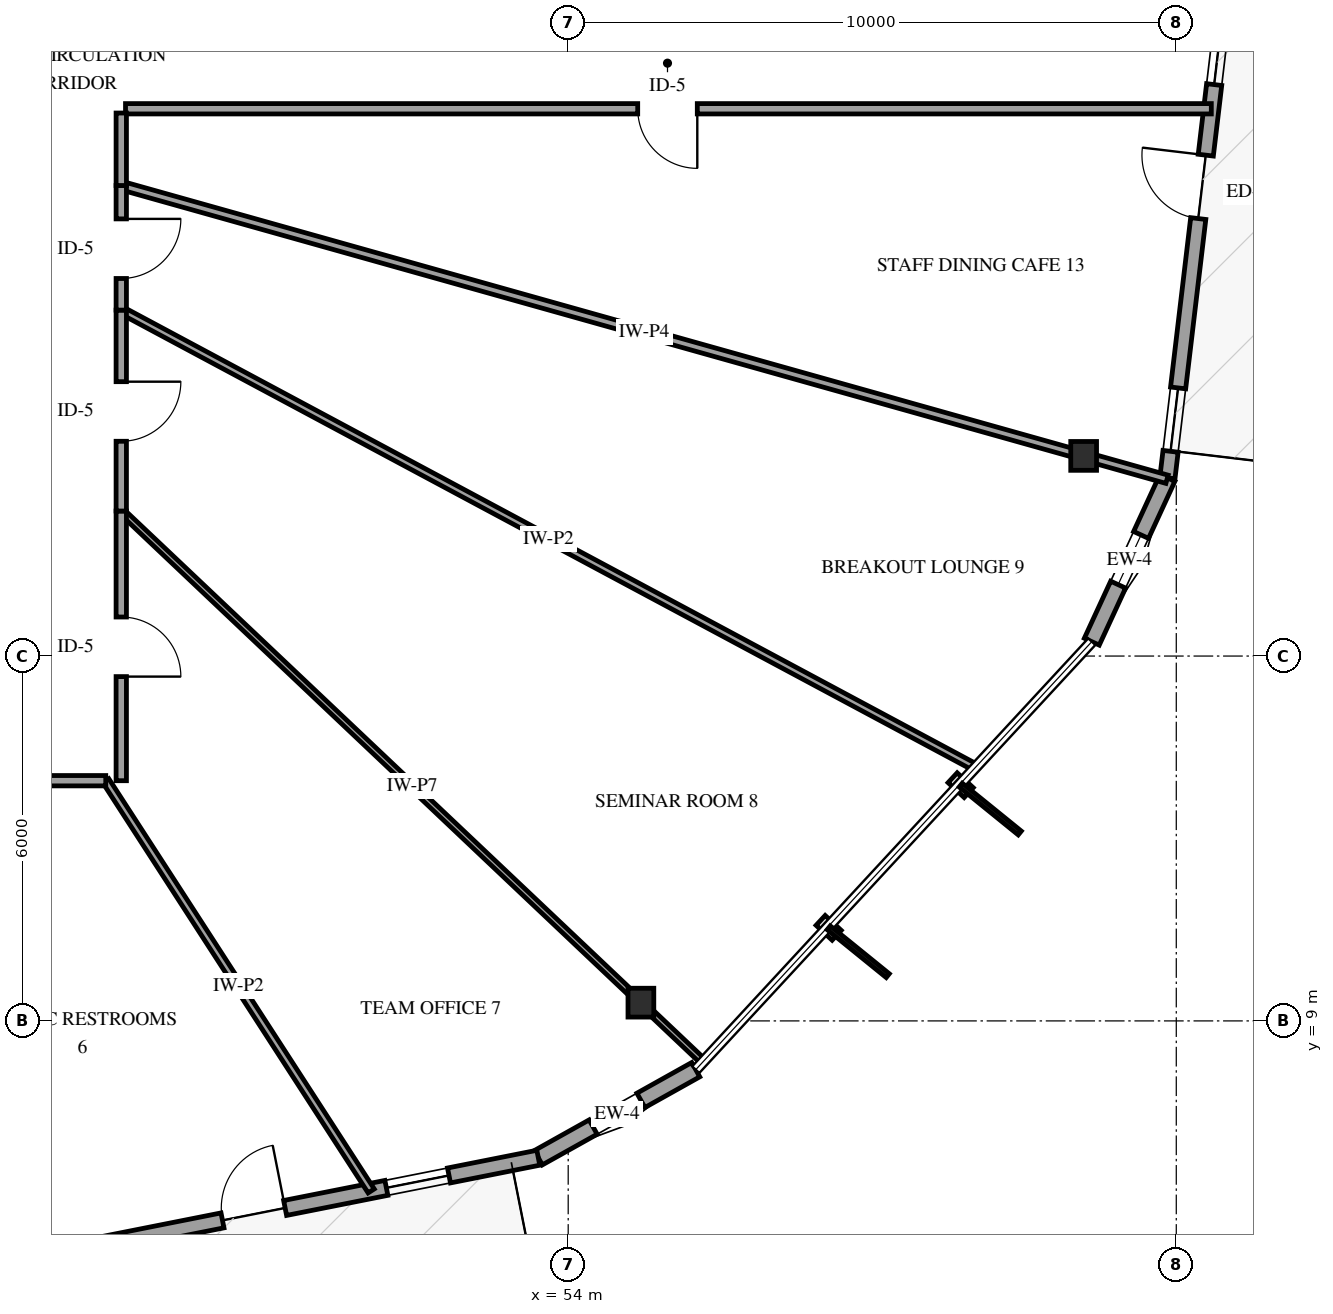
"""IFC4 building model, lengths in metres.
Left out: names, types, materials, properties, quantities, classifications, styles, units other than length and angle.
Written with IfcOpenShell. Run it as: python <this file> out.ifc"""

import sys

from ifc_helpers import new_model, si_unit, direction, frame, frame_2d, origin, origin_2d, place, context, subcontext, project, spatial, rectangle, i_section, extrude, element, fill, save


model = new_model("IFC4")
c1 = context("Model", 3, precision=1e-05, world=origin(), true_north=direction((0.0, 1.0)))
c2 = subcontext(c1, "Body", "Model", "MODEL_VIEW")
j1 = project(units=[si_unit("LENGTHUNIT", "METRE"), si_unit("PLANEANGLEUNIT", "RADIAN")], contexts=[c1])
p1 = place(None, origin())
s1 = spatial("IfcSite", under=j1, at=p1, CompositionType="ELEMENT")
p2 = place(p1, origin())
s2 = spatial("IfcBuilding", under=s1, at=p2, CompositionType="ELEMENT")
p3 = place(p2, frame((0.0, 0.0, 70.6)))
s3 = spatial("IfcBuildingStorey", under=s2, at=p3, CompositionType="ELEMENT", Elevation=70.6)
for number, where, z_axis, x_axis in (
    (1, (55.196, 9.3, 0.0), (0.0, 0.0, 1.0), (1.0, 0.0, 0.0)),
    (2, (62.477, 18.292, 0.0), (0.0, 0.0, 1.0), (1.0, 0.0, 0.0)),
):
    element("IfcColumn", number, at=place(p3, frame(where, z_axis=z_axis, x_axis=x_axis)), inside=s3, PredefinedType="COLUMN", context=c2, shape_type="SweptSolid", body=[
        extrude(i_section(OverallWidth=0.424, OverallDepth=0.474, WebThickness=0.048, FlangeThickness=0.077, FilletRadius=0.038, at=origin_2d()), origin(), (0.0, 0.0, 1.0), 4.0),
    ])
p4 = place(p3, frame((53.509, 6.75, 0.0), z_axis=(0.0, 0.0, 1.0), x_axis=(0.872744478874, 0.48817729832, 0.0)))
e3 = element("IfcWall", 3, at=p4, inside=s3, PredefinedType="SOLIDWALL", context=c2, shape_type="SweptSolid", body=[
    extrude(rectangle(XDim=2.967, YDim=0.27, at=frame_2d((1.483, 0.0))), origin(), (0.0, 0.0, 1.0), 3.079),
])
p5 = place(p4, frame((1.033, 0.0, 0.75)))
e4 = element("IfcOpeningElement", 4, at=p5, cuts=e3, PredefinedType="OPENING", context=c2, shape_type="SweptSolid", body=[
    extrude(rectangle(XDim=0.9, YDim=1.5, at=frame_2d((0.45, 0.75))), frame((0.0, 0.145, 0.0), z_axis=(0.0, -1.0, 0.0), x_axis=(1.0, 0.0, 0.0)), (0.0, 0.0, 1.0), 0.29),
])
p6 = place(p3, frame((44.102, 4.884, 0.0), z_axis=(0.0, 0.0, 1.0), x_axis=(0.980886929862, 0.194578598067, 0.0)))
e5 = element("IfcWall", 5, at=p6, inside=s3, PredefinedType="SOLIDWALL", context=c2, shape_type="SweptSolid", body=[
    extrude(rectangle(XDim=9.59, YDim=0.25, at=frame_2d((4.795, 0.0))), origin(), (0.0, 0.0, 1.0), 3.079),
])
p7 = place(p6, frame((4.295, 0.0, 0.0)))
e6 = element("IfcOpeningElement", 6, at=p7, cuts=e5, PredefinedType="OPENING", context=c2, shape_type="SweptSolid", body=[
    extrude(rectangle(XDim=1.05, YDim=2.15, at=frame_2d((0.525, 1.075))), frame((0.0, 0.135, 0.0), z_axis=(0.0, -1.0, 0.0), x_axis=(1.0, 0.0, 0.0)), (0.0, 0.0, 1.0), 0.27),
])
p8 = place(p6, frame((0.62, 0.0, 0.72)))
e7 = element("IfcOpeningElement", 7, at=p8, cuts=e5, PredefinedType="OPENING", context=c2, shape_type="SweptSolid", body=[
    extrude(rectangle(XDim=1.05, YDim=1.55, at=frame_2d((0.525, 0.775))), frame((0.0, 0.135, 0.0), z_axis=(0.0, -1.0, 0.0), x_axis=(1.0, 0.0, 0.0)), (0.0, 0.0, 1.0), 0.27),
])
p9 = place(p6, frame((7.042, 0.0, 0.72)))
e8 = element("IfcOpeningElement", 8, at=p9, cuts=e5, PredefinedType="OPENING", context=c2, shape_type="SweptSolid", body=[
    extrude(rectangle(XDim=1.05, YDim=1.55, at=frame_2d((0.525, 0.775))), frame((0.0, 0.135, 0.0), z_axis=(0.0, -1.0, 0.0), x_axis=(1.0, 0.0, 0.0)), (0.0, 0.0, 1.0), 0.27),
])
p10 = place(p3, frame((62.611, 15.236, 0.0), z_axis=(0.0, 0.0, 1.0), x_axis=(0.419146897393, 0.907918431582, 0.0)))
e9 = element("IfcWall", 9, at=p10, inside=s3, PredefinedType="SOLIDWALL", context=c2, shape_type="SweptSolid", body=[
    extrude(rectangle(XDim=2.967, YDim=0.27, at=frame_2d((1.483, 0.0))), origin(), (0.0, 0.0, 1.0), 3.079),
])
p11 = place(p10, frame((1.033, 0.0, 0.75)))
e10 = element("IfcOpeningElement", 10, at=p11, cuts=e9, PredefinedType="OPENING", context=c2, shape_type="SweptSolid", body=[
    extrude(rectangle(XDim=0.9, YDim=1.5, at=frame_2d((0.45, 0.75))), frame((0.0, 0.145, 0.0), z_axis=(0.0, -1.0, 0.0), x_axis=(1.0, 0.0, 0.0)), (0.0, 0.0, 1.0), 0.29),
])
p12 = place(p3, frame((63.854, 17.93, 0.0), z_axis=(0.0, 0.0, 1.0), x_axis=(0.118050916003, 0.993007543391, 0.0)))
e11 = element("IfcWall", 11, at=p12, inside=s3, PredefinedType="SOLIDWALL", context=c2, shape_type="SweptSolid", body=[
    extrude(rectangle(XDim=9.59, YDim=0.25, at=frame_2d((4.795, 0.0))), origin(), (0.0, 0.0, 1.0), 3.079),
])
p13 = place(p12, frame((4.295, 0.0, 0.0)))
e12 = element("IfcOpeningElement", 12, at=p13, cuts=e11, PredefinedType="OPENING", context=c2, shape_type="SweptSolid", body=[
    extrude(rectangle(XDim=1.05, YDim=2.15, at=frame_2d((0.525, 1.075))), frame((0.0, 0.135, 0.0), z_axis=(0.0, -1.0, 0.0), x_axis=(1.0, 0.0, 0.0)), (0.0, 0.0, 1.0), 0.27),
])
p14 = place(p12, frame((0.44, 0.0, 0.72)))
e13 = element("IfcOpeningElement", 13, at=p14, cuts=e11, PredefinedType="OPENING", context=c2, shape_type="SweptSolid", body=[
    extrude(rectangle(XDim=1.05, YDim=1.55, at=frame_2d((0.525, 0.775))), frame((0.0, 0.135, 0.0), z_axis=(0.0, -1.0, 0.0), x_axis=(1.0, 0.0, 0.0)), (0.0, 0.0, 1.0), 0.27),
])
p15 = place(p12, frame((6.514, 0.0, 0.72)))
e14 = element("IfcOpeningElement", 14, at=p15, cuts=e11, PredefinedType="OPENING", context=c2, shape_type="SweptSolid", body=[
    extrude(rectangle(XDim=1.05, YDim=1.55, at=frame_2d((0.525, 0.775))), frame((0.0, 0.135, 0.0), z_axis=(0.0, -1.0, 0.0), x_axis=(1.0, 0.0, 0.0)), (0.0, 0.0, 1.0), 0.27),
])
p16 = place(p3, frame((46.65, 22.738, 0.0), z_axis=(0.0, 0.0, 1.0), x_axis=(0.96273671491, -0.270440414443, 0.0)))
e15 = element("IfcWall", 15, at=p16, inside=s3, PredefinedType="PARTITIONING", context=c2, shape_type="SweptSolid", body=[
    extrude(rectangle(XDim=17.864, YDim=0.14, at=frame_2d((8.932, 0.0))), origin(), (0.0, 0.0, 1.0), 2.995),
])
p17 = place(p3, frame((64.576, 24.0, 0.0), z_axis=(0.0, 0.0, 1.0), x_axis=(-1.0, 0.0, 0.0)))
e16 = element("IfcWall", 16, at=p17, inside=s3, PredefinedType="PARTITIONING", context=c2, shape_type="SweptSolid", body=[
    extrude(rectangle(XDim=17.856, YDim=0.17, at=frame_2d((8.928, 0.0))), origin(), (0.0, 0.0, 1.0), 3.7),
])
p18 = place(p17, frame((8.453, 0.0, 0.0)))
e17 = element("IfcOpeningElement", 17, at=p18, cuts=e16, PredefinedType="OPENING", context=c2, shape_type="SweptSolid", body=[
    extrude(rectangle(XDim=0.98, YDim=2.15, at=frame_2d((0.49, 1.075))), frame((0.0, 0.095, 0.0), z_axis=(0.0, -1.0, 0.0), x_axis=(1.0, 0.0, 0.0)), (0.0, 0.0, 1.0), 0.19),
])
p19 = place(p3, frame((46.65, 20.689, 0.0), z_axis=(0.0, 0.0, 1.0), x_axis=(0.881590875685, -0.472014330194, 0.0)))
e18 = element("IfcWall", 18, at=p19, inside=s3, PredefinedType="PARTITIONING", context=c2, shape_type="SweptSolid", body=[
    extrude(rectangle(XDim=15.934, YDim=0.12, at=frame_2d((7.967, 0.0))), origin(), (0.0, 0.0, 1.0), 3.7),
])
p20 = place(p3, frame((46.65, 17.385, 0.0), z_axis=(0.0, 0.0, 1.0), x_axis=(0.726386402193, -0.687286544834, 0.0)))
e19 = element("IfcWall", 19, at=p20, inside=s3, PredefinedType="PARTITIONING", context=c2, shape_type="SweptSolid", body=[
    extrude(rectangle(XDim=13.175, YDim=0.1, at=frame_2d((6.587, 0.0))), origin(), (0.0, 0.0, 1.0), 2.995),
])
p21 = place(p3, frame((46.395, 12.95, 0.0), z_axis=(0.0, 0.0, 1.0), x_axis=(0.543253797888, -0.839568526733, 0.0)))
e20 = element("IfcWall", 20, at=p21, inside=s3, PredefinedType="PARTITIONING", context=c2, shape_type="SweptSolid", body=[
    extrude(rectangle(XDim=8.035, YDim=0.12, at=frame_2d((4.018, 0.0))), origin(), (0.0, 0.0, 1.0), 3.7),
])
p22 = place(p3, frame((46.65, 17.385, 0.0), z_axis=(0.0, 0.0, 1.0), x_axis=(0.0, -1.0, 0.0)))
e21 = element("IfcWall", 21, at=p22, inside=s3, PredefinedType="PARTITIONING", context=c2, shape_type="SweptSolid", body=[
    extrude(rectangle(XDim=4.435, YDim=0.17, at=frame_2d((2.218, 0.0))), origin(), (0.0, 0.0, 1.0), 3.7),
])
p23 = place(p22, frame((1.743, 0.0, 0.0)))
e22 = element("IfcOpeningElement", 22, at=p23, cuts=e21, PredefinedType="OPENING", context=c2, shape_type="SweptSolid", body=[
    extrude(rectangle(XDim=0.98, YDim=2.15, at=frame_2d((0.49, 1.075))), frame((0.0, 0.095, 0.0), z_axis=(0.0, -1.0, 0.0), x_axis=(1.0, 0.0, 0.0)), (0.0, 0.0, 1.0), 0.19),
])
p24 = place(p3, frame((46.395, 12.95, 0.0), z_axis=(0.0, 0.0, 1.0), x_axis=(-1.0, 0.0, 0.0)))
e23 = element("IfcWall", 23, at=p24, inside=s3, PredefinedType="PARTITIONING", context=c2, shape_type="SweptSolid", body=[
    extrude(rectangle(XDim=4.301, YDim=0.17, at=frame_2d((2.15, 0.0))), origin(), (0.0, 0.0, 1.0), 3.7),
])
p25 = place(p24, frame((1.676, 0.0, 0.0)))
e24 = element("IfcOpeningElement", 24, at=p25, cuts=e23, PredefinedType="OPENING", context=c2, shape_type="SweptSolid", body=[
    extrude(rectangle(XDim=0.98, YDim=2.15, at=frame_2d((0.49, 1.075))), frame((0.0, 0.095, 0.0), z_axis=(0.0, -1.0, 0.0), x_axis=(1.0, 0.0, 0.0)), (0.0, 0.0, 1.0), 0.19),
])
p26 = place(p3, frame((46.65, 20.689, 0.0), z_axis=(0.0, 0.0, 1.0), x_axis=(0.0, -1.0, 0.0)))
e25 = element("IfcWall", 25, at=p26, inside=s3, PredefinedType="PARTITIONING", context=c2, shape_type="SweptSolid", body=[
    extrude(rectangle(XDim=3.304, YDim=0.17, at=frame_2d((1.652, 0.0))), origin(), (0.0, 0.0, 1.0), 3.7),
])
p27 = place(p26, frame((1.177, 0.0, 0.0)))
e26 = element("IfcOpeningElement", 26, at=p27, cuts=e25, PredefinedType="OPENING", context=c2, shape_type="SweptSolid", body=[
    extrude(rectangle(XDim=0.98, YDim=2.15, at=frame_2d((0.49, 1.075))), frame((0.0, 0.095, 0.0), z_axis=(0.0, -1.0, 0.0), x_axis=(1.0, 0.0, 0.0)), (0.0, 0.0, 1.0), 0.19),
])
p28 = place(p3, frame((46.65, 22.738, 0.0), z_axis=(0.0, 0.0, 1.0), x_axis=(0.0, -1.0, 0.0)))
e27 = element("IfcWall", 27, at=p28, inside=s3, PredefinedType="PARTITIONING", context=c2, shape_type="SweptSolid", body=[
    extrude(rectangle(XDim=2.049, YDim=0.17, at=frame_2d((1.024, 0.0))), origin(), (0.0, 0.0, 1.0), 3.7),
])
p29 = place(p28, frame((0.549, 0.0, 0.0)))
e28 = element("IfcOpeningElement", 28, at=p29, cuts=e27, PredefinedType="OPENING", context=c2, shape_type="SweptSolid", body=[
    extrude(rectangle(XDim=0.98, YDim=2.15, at=frame_2d((0.49, 1.075))), frame((0.0, 0.095, 0.0), z_axis=(0.0, -1.0, 0.0), x_axis=(1.0, 0.0, 0.0)), (0.0, 0.0, 1.0), 0.19),
])
p30 = place(p3, frame((46.65, 23.93, 0.0), z_axis=(0.0, 0.0, 1.0), x_axis=(0.0, -1.0, 0.0)))
e29 = element("IfcWall", 29, at=p30, inside=s3, PredefinedType="PARTITIONING", context=c2, shape_type="SweptSolid", body=[
    extrude(rectangle(XDim=1.192, YDim=0.17, at=frame_2d((0.596, 0.0))), origin(), (0.0, 0.0, 1.0), 3.7),
])
p31 = place(p5, origin())
e30 = element("IfcWindow", 30, at=p31, inside=s3, PartitioningType="SINGLE_PANEL", PredefinedType="WINDOW", context=c2, shape_type="SweptSolid", body=[
    extrude(rectangle(XDim=0.9, YDim=1.5, at=frame_2d((0.45, 0.75))), frame((0.0, 0.03, 0.0), z_axis=(0.0, -1.0, 0.0), x_axis=(1.0, 0.0, 0.0)), (0.0, 0.0, 1.0), 0.06),
])
fill(e4, e30)
p32 = place(p7, origin())
e31 = element("IfcDoor", 31, at=p32, inside=s3, OperationType="SINGLE_SWING_RIGHT", PredefinedType="DOOR", context=c2, shape_type="SweptSolid", body=[
    extrude(rectangle(XDim=1.05, YDim=2.15, at=frame_2d((0.525, 1.075))), frame((0.0, 0.025, 0.0), z_axis=(0.0, -1.0, 0.0), x_axis=(1.0, 0.0, 0.0)), (0.0, 0.0, 1.0), 0.05),
])
fill(e6, e31)
p33 = place(p9, origin())
e32 = element("IfcWindow", 32, at=p33, inside=s3, PartitioningType="SINGLE_PANEL", PredefinedType="WINDOW", context=c2, shape_type="SweptSolid", body=[
    extrude(rectangle(XDim=1.05, YDim=1.55, at=frame_2d((0.525, 0.775))), frame((0.0, 0.03, 0.0), z_axis=(0.0, -1.0, 0.0), x_axis=(1.0, 0.0, 0.0)), (0.0, 0.0, 1.0), 0.06),
])
fill(e8, e32)
p34 = place(p11, origin())
e33 = element("IfcWindow", 33, at=p34, inside=s3, PartitioningType="SINGLE_PANEL", PredefinedType="WINDOW", context=c2, shape_type="SweptSolid", body=[
    extrude(rectangle(XDim=0.9, YDim=1.5, at=frame_2d((0.45, 0.75))), frame((0.0, 0.03, 0.0), z_axis=(0.0, -1.0, 0.0), x_axis=(1.0, 0.0, 0.0)), (0.0, 0.0, 1.0), 0.06),
])
fill(e10, e33)
p35 = place(p13, origin())
e34 = element("IfcDoor", 34, at=p35, inside=s3, OperationType="SINGLE_SWING_RIGHT", PredefinedType="DOOR", context=c2, shape_type="SweptSolid", body=[
    extrude(rectangle(XDim=1.05, YDim=2.15, at=frame_2d((0.525, 1.075))), frame((0.0, 0.025, 0.0), z_axis=(0.0, -1.0, 0.0), x_axis=(1.0, 0.0, 0.0)), (0.0, 0.0, 1.0), 0.05),
])
fill(e12, e34)
p36 = place(p14, origin())
e35 = element("IfcWindow", 35, at=p36, inside=s3, PartitioningType="SINGLE_PANEL", PredefinedType="WINDOW", context=c2, shape_type="SweptSolid", body=[
    extrude(rectangle(XDim=1.05, YDim=1.55, at=frame_2d((0.525, 0.775))), frame((0.0, 0.03, 0.0), z_axis=(0.0, -1.0, 0.0), x_axis=(1.0, 0.0, 0.0)), (0.0, 0.0, 1.0), 0.06),
])
fill(e13, e35)
p37 = place(p15, origin())
e36 = element("IfcWindow", 36, at=p37, inside=s3, PartitioningType="SINGLE_PANEL", PredefinedType="WINDOW", context=c2, shape_type="SweptSolid", body=[
    extrude(rectangle(XDim=1.05, YDim=1.55, at=frame_2d((0.525, 0.775))), frame((0.0, 0.03, 0.0), z_axis=(0.0, -1.0, 0.0), x_axis=(1.0, 0.0, 0.0)), (0.0, 0.0, 1.0), 0.06),
])
fill(e14, e36)
p38 = place(p18, origin())
e37 = element("IfcDoor", 37, at=p38, inside=s3, OperationType="SINGLE_SWING_LEFT", PredefinedType="DOOR", context=c2, shape_type="SweptSolid", body=[
    extrude(rectangle(XDim=0.98, YDim=2.15, at=frame_2d((0.49, 1.075))), frame((0.0, 0.025, 0.0), z_axis=(0.0, -1.0, 0.0), x_axis=(1.0, 0.0, 0.0)), (0.0, 0.0, 1.0), 0.05),
])
fill(e17, e37)
p39 = place(p23, origin())
e38 = element("IfcDoor", 38, at=p39, inside=s3, OperationType="SINGLE_SWING_RIGHT", PredefinedType="DOOR", context=c2, shape_type="SweptSolid", body=[
    extrude(rectangle(XDim=0.98, YDim=2.15, at=frame_2d((0.49, 1.075))), frame((0.0, 0.025, 0.0), z_axis=(0.0, -1.0, 0.0), x_axis=(1.0, 0.0, 0.0)), (0.0, 0.0, 1.0), 0.05),
])
fill(e22, e38)
p40 = place(p27, origin())
e39 = element("IfcDoor", 39, at=p40, inside=s3, OperationType="SINGLE_SWING_LEFT", PredefinedType="DOOR", context=c2, shape_type="SweptSolid", body=[
    extrude(rectangle(XDim=0.98, YDim=2.15, at=frame_2d((0.49, 1.075))), frame((0.0, 0.025, 0.0), z_axis=(0.0, -1.0, 0.0), x_axis=(1.0, 0.0, 0.0)), (0.0, 0.0, 1.0), 0.05),
])
fill(e26, e39)
p41 = place(p29, origin())
e40 = element("IfcDoor", 40, at=p41, inside=s3, OperationType="SINGLE_SWING_LEFT", PredefinedType="DOOR", context=c2, shape_type="SweptSolid", body=[
    extrude(rectangle(XDim=0.98, YDim=2.15, at=frame_2d((0.49, 1.075))), frame((0.0, 0.025, 0.0), z_axis=(0.0, -1.0, 0.0), x_axis=(1.0, 0.0, 0.0)), (0.0, 0.0, 1.0), 0.05),
])
fill(e28, e40)
save(model, sys.argv[1])
